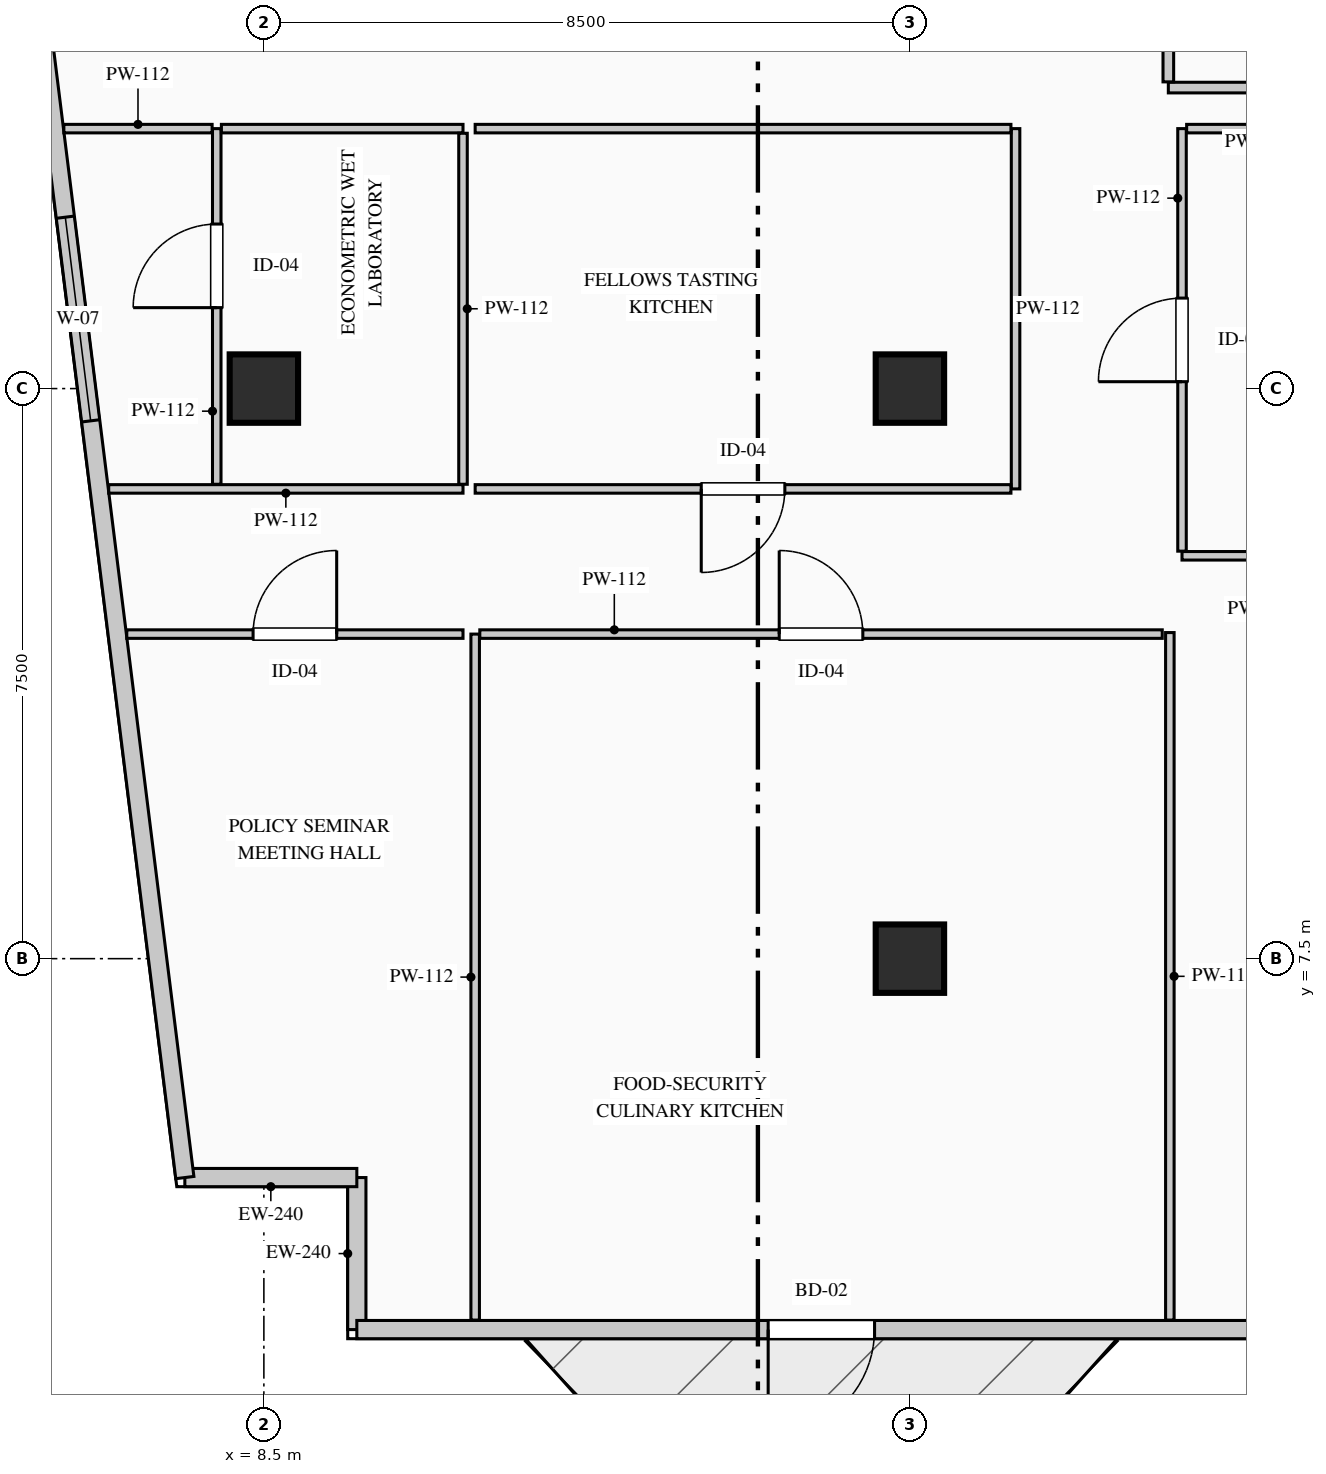
"""IFC4 building model, lengths in metres.
Left out: names, types, materials, properties, quantities, classifications, styles, units other than length and angle.
Written with IfcOpenShell. Run it as: python <this file> out.ifc"""

import sys

from ifc_helpers import new_model, si_unit, direction, frame, frame_2d, origin, origin_2d, place, context, subcontext, project, spatial, rectangle, extrude, element, fill, save


model = new_model("IFC4")
c1 = context("Model", 3, precision=1e-05, world=origin(), true_north=direction((0.0, 1.0)))
c2 = subcontext(c1, "Body", "Model", "MODEL_VIEW")
j1 = project(units=[si_unit("LENGTHUNIT", "METRE"), si_unit("PLANEANGLEUNIT", "RADIAN")], contexts=[c1])
p1 = place(None, origin())
s1 = spatial("IfcSite", under=j1, at=p1, CompositionType="ELEMENT")
p2 = place(p1, origin())
s2 = spatial("IfcBuilding", under=s1, at=p2, CompositionType="ELEMENT")
p3 = place(p2, frame((0.0, 0.0, 207.45)))
s3 = spatial("IfcBuildingStorey", under=s2, at=p3, CompositionType="ELEMENT", Elevation=207.45)
for number, where, z_axis, x_axis in (
    (1, (8.5, 15.0, 0.0), (0.0, 0.0, 1.0), (1.0, 0.0, 0.0)),
    (2, (17.0, 7.5, 0.0), (0.0, 0.0, 1.0), (1.0, 0.0, 0.0)),
    (3, (17.0, 15.0, 0.0), (0.0, 0.0, 1.0), (1.0, 0.0, 0.0)),
):
    element("IfcColumn", number, at=place(p3, frame(where, z_axis=z_axis, x_axis=x_axis)), inside=s3, PredefinedType="COLUMN", context=c2, shape_type="SweptSolid", body=[
        extrude(rectangle(XDim=0.9, YDim=0.9, at=origin_2d()), origin(), (0.0, 0.0, 1.0), 3.95),
    ])
p4 = place(p3, frame((9.723, 2.62, 0.0), z_axis=(0.0, 0.0, 1.0), x_axis=(0.0, 1.0, 0.0)))
e4 = element("IfcWall", 4, at=p4, inside=s3, PredefinedType="STANDARD", context=c2, shape_type="SweptSolid", body=[
    extrude(rectangle(XDim=2.0, YDim=0.24, at=frame_2d((1.0, 0.0))), origin(), (0.0, 0.0, 1.0), 3.7),
])
p5 = place(p3, frame((9.723, 4.62, 0.0), z_axis=(0.0, 0.0, 1.0), x_axis=(-1.0, 0.0, 0.0)))
e5 = element("IfcWall", 5, at=p5, inside=s3, PredefinedType="STANDARD", context=c2, shape_type="SweptSolid", body=[
    extrude(rectangle(XDim=2.263, YDim=0.24, at=frame_2d((1.131, 0.0))), origin(), (0.0, 0.0, 1.0), 3.7),
])
p6 = place(p3, frame((7.46, 4.62, 0.0), z_axis=(0.0, 0.0, 1.0), x_axis=(-0.123515576323, 0.992342633573, 0.0)))
e6 = element("IfcWall", 6, at=p6, inside=s3, PredefinedType="STANDARD", context=c2, shape_type="SweptSolid", body=[
    extrude(rectangle(XDim=37.043, YDim=0.24, at=frame_2d((18.522, 0.0))), origin(), (0.0, 0.0, 1.0), 3.7),
])
p7 = place(p6, frame((10.032, 0.0, 0.9)))
e7 = element("IfcOpeningElement", 7, at=p7, cuts=e6, PredefinedType="OPENING", context=c2, shape_type="SweptSolid", body=[
    extrude(rectangle(XDim=2.7, YDim=2.1, at=frame_2d((1.35, 1.05))), frame((0.0, 0.13, 0.0), z_axis=(0.0, -1.0, 0.0), x_axis=(1.0, 0.0, 0.0)), (0.0, 0.0, 1.0), 0.26),
])
p8 = place(p3, frame((21.946, 2.62, 0.0), z_axis=(0.0, 0.0, 1.0), x_axis=(-1.0, 0.0, 0.0)))
e8 = element("IfcWall", 8, at=p8, inside=s3, PredefinedType="STANDARD", context=c2, shape_type="SweptSolid", body=[
    extrude(rectangle(XDim=12.223, YDim=0.24, at=frame_2d((6.112, 0.0))), origin(), (0.0, 0.0, 1.0), 3.7),
])
p9 = place(p8, frame((5.411, 0.0, 0.0)))
e9 = element("IfcOpeningElement", 9, at=p9, cuts=e8, PredefinedType="OPENING", context=c2, shape_type="SweptSolid", body=[
    extrude(rectangle(XDim=1.4, YDim=2.2, at=frame_2d((0.7, 1.1))), frame((0.0, 0.13, 0.0), z_axis=(0.0, -1.0, 0.0), x_axis=(1.0, 0.0, 0.0)), (0.0, 0.0, 1.0), 0.26),
])
p10 = place(p3, frame((22.725, 18.96, 0.0), z_axis=(0.0, 0.0, 1.0), x_axis=(-1.0, 0.0, 0.0)))
e10 = element("IfcWall", 10, at=p10, inside=s3, PredefinedType="PARTITIONING", context=c2, shape_type="SweptSolid", body=[
    extrude(rectangle(XDim=2.325, YDim=0.14, at=frame_2d((1.163, 0.0))), origin(), (0.0, 0.0, 1.0), 3.7),
])
p11 = place(p3, frame((20.4, 19.035, 0.0), z_axis=(0.0, 0.0, 1.0), x_axis=(0.0, 1.0, 0.0)))
e11 = element("IfcWall", 11, at=p11, inside=s3, PredefinedType="PARTITIONING", context=c2, shape_type="SweptSolid", body=[
    extrude(rectangle(XDim=2.965, YDim=0.14, at=frame_2d((1.482, 0.0))), origin(), (0.0, 0.0, 1.0), 3.7),
])
p12 = place(p11, frame((1.008, 0.0, 0.0)))
e12 = element("IfcOpeningElement", 12, at=p12, cuts=e11, PredefinedType="OPENING", context=c2, shape_type="SweptSolid", body=[
    extrude(rectangle(XDim=0.95, YDim=2.15, at=frame_2d((0.475, 1.075))), frame((0.0, 0.08, 0.0), z_axis=(0.0, -1.0, 0.0), x_axis=(1.0, 0.0, 0.0)), (0.0, 0.0, 1.0), 0.16),
])
p13 = place(p3, frame((11.28, 2.745, 0.0), z_axis=(0.0, 0.0, 1.0), x_axis=(0.0, 1.0, 0.0)))
e13 = element("IfcWall", 13, at=p13, inside=s3, PredefinedType="PARTITIONING", context=c2, shape_type="SweptSolid", body=[
    extrude(rectangle(XDim=9.025, YDim=0.112, at=frame_2d((4.512, 0.0))), origin(), (0.0, 0.0, 1.0), 3.7),
])
p14 = place(p3, frame((11.341, 11.77, 0.0), z_axis=(0.0, 0.0, 1.0), x_axis=(1.0, 0.0, 0.0)))
e14 = element("IfcWall", 14, at=p14, inside=s3, PredefinedType="PARTITIONING", context=c2, shape_type="SweptSolid", body=[
    extrude(rectangle(XDim=8.979, YDim=0.112, at=frame_2d((4.49, 0.0))), origin(), (0.0, 0.0, 1.0), 3.7),
])
p15 = place(p14, frame((3.939, 0.0, 0.0)))
e15 = element("IfcOpeningElement", 15, at=p15, cuts=e14, PredefinedType="OPENING", context=c2, shape_type="SweptSolid", body=[
    extrude(rectangle(XDim=1.1, YDim=2.2, at=frame_2d((0.55, 1.1))), frame((0.0, 0.066, 0.0), z_axis=(0.0, -1.0, 0.0), x_axis=(1.0, 0.0, 0.0)), (0.0, 0.0, 1.0), 0.132),
])
p16 = place(p3, frame((20.42, 11.79, 0.0), z_axis=(0.0, 0.0, 1.0), x_axis=(0.0, -1.0, 0.0)))
e16 = element("IfcWall", 16, at=p16, inside=s3, PredefinedType="PARTITIONING", context=c2, shape_type="SweptSolid", body=[
    extrude(rectangle(XDim=9.045, YDim=0.112, at=frame_2d((4.522, 0.0))), origin(), (0.0, 0.0, 1.0), 3.7),
])
p17 = place(p3, frame((6.696, 11.77, 0.0), z_axis=(0.0, 0.0, 1.0), x_axis=(1.0, 0.0, 0.0)))
e17 = element("IfcWall", 17, at=p17, inside=s3, PredefinedType="PARTITIONING", context=c2, shape_type="SweptSolid", body=[
    extrude(rectangle(XDim=4.424, YDim=0.112, at=frame_2d((2.212, 0.0))), origin(), (0.0, 0.0, 1.0), 3.7),
])
p18 = place(p17, frame((1.662, 0.0, 0.0)))
e18 = element("IfcOpeningElement", 18, at=p18, cuts=e17, PredefinedType="OPENING", context=c2, shape_type="SweptSolid", body=[
    extrude(rectangle(XDim=1.1, YDim=2.2, at=frame_2d((0.55, 1.1))), frame((0.0, 0.066, 0.0), z_axis=(0.0, -1.0, 0.0), x_axis=(1.0, 0.0, 0.0)), (0.0, 0.0, 1.0), 0.132),
])
p19 = place(p3, frame((11.12, 13.68, 0.0), z_axis=(0.0, 0.0, 1.0), x_axis=(-1.0, 0.0, 0.0)))
e19 = element("IfcWall", 19, at=p19, inside=s3, PredefinedType="PARTITIONING", context=c2, shape_type="SweptSolid", body=[
    extrude(rectangle(XDim=4.662, YDim=0.112, at=frame_2d((2.331, 0.0))), origin(), (0.0, 0.0, 1.0), 3.7),
])
p20 = place(p3, frame((7.88, 13.741, 0.0), z_axis=(0.0, 0.0, 1.0), x_axis=(0.0, 1.0, 0.0)))
e20 = element("IfcWall", 20, at=p20, inside=s3, PredefinedType="PARTITIONING", context=c2, shape_type="SweptSolid", body=[
    extrude(rectangle(XDim=4.679, YDim=0.112, at=frame_2d((2.339, 0.0))), origin(), (0.0, 0.0, 1.0), 3.7),
])
p21 = place(p20, frame((2.324, 0.0, 0.0)))
e21 = element("IfcOpeningElement", 21, at=p21, cuts=e20, PredefinedType="OPENING", context=c2, shape_type="SweptSolid", body=[
    extrude(rectangle(XDim=1.1, YDim=2.2, at=frame_2d((0.55, 1.1))), frame((0.0, 0.066, 0.0), z_axis=(0.0, -1.0, 0.0), x_axis=(1.0, 0.0, 0.0)), (0.0, 0.0, 1.0), 0.132),
])
p22 = place(p3, frame((5.868, 18.42, 0.0), z_axis=(0.0, 0.0, 1.0), x_axis=(1.0, 0.0, 0.0)))
e22 = element("IfcWall", 22, at=p22, inside=s3, PredefinedType="PARTITIONING", context=c2, shape_type="SweptSolid", body=[
    extrude(rectangle(XDim=1.951, YDim=0.112, at=frame_2d((0.975, 0.0))), origin(), (0.0, 0.0, 1.0), 3.7),
])
p23 = place(p3, frame((7.941, 18.42, 0.0), z_axis=(0.0, 0.0, 1.0), x_axis=(1.0, 0.0, 0.0)))
e23 = element("IfcWall", 23, at=p23, inside=s3, PredefinedType="PARTITIONING", context=c2, shape_type="SweptSolid", body=[
    extrude(rectangle(XDim=3.179, YDim=0.112, at=frame_2d((1.59, 0.0))), origin(), (0.0, 0.0, 1.0), 3.7),
])
p24 = place(p3, frame((11.12, 18.359, 0.0), z_axis=(0.0, 0.0, 1.0), x_axis=(0.0, -1.0, 0.0)))
e24 = element("IfcWall", 24, at=p24, inside=s3, PredefinedType="PARTITIONING", context=c2, shape_type="SweptSolid", body=[
    extrude(rectangle(XDim=4.618, YDim=0.112, at=frame_2d((2.309, 0.0))), origin(), (0.0, 0.0, 1.0), 3.7),
])
p25 = place(p3, frame((18.39, 18.42, 0.0), z_axis=(0.0, 0.0, 1.0), x_axis=(0.0, -1.0, 0.0)))
e25 = element("IfcWall", 25, at=p25, inside=s3, PredefinedType="PARTITIONING", context=c2, shape_type="SweptSolid", body=[
    extrude(rectangle(XDim=4.74, YDim=0.112, at=frame_2d((2.37, 0.0))), origin(), (0.0, 0.0, 1.0), 3.7),
])
p26 = place(p3, frame((18.329, 13.68, 0.0), z_axis=(0.0, 0.0, 1.0), x_axis=(-1.0, 0.0, 0.0)))
e26 = element("IfcWall", 26, at=p26, inside=s3, PredefinedType="PARTITIONING", context=c2, shape_type="SweptSolid", body=[
    extrude(rectangle(XDim=7.049, YDim=0.112, at=frame_2d((3.524, 0.0))), origin(), (0.0, 0.0, 1.0), 3.7),
])
p27 = place(p26, frame((2.975, 0.0, 0.0)))
e27 = element("IfcOpeningElement", 27, at=p27, cuts=e26, PredefinedType="OPENING", context=c2, shape_type="SweptSolid", body=[
    extrude(rectangle(XDim=1.1, YDim=2.2, at=frame_2d((0.55, 1.1))), frame((0.0, 0.066, 0.0), z_axis=(0.0, -1.0, 0.0), x_axis=(1.0, 0.0, 0.0)), (0.0, 0.0, 1.0), 0.132),
])
p28 = place(p3, frame((11.28, 18.42, 0.0), z_axis=(0.0, 0.0, 1.0), x_axis=(1.0, 0.0, 0.0)))
e28 = element("IfcWall", 28, at=p28, inside=s3, PredefinedType="PARTITIONING", context=c2, shape_type="SweptSolid", body=[
    extrude(rectangle(XDim=7.049, YDim=0.112, at=frame_2d((3.524, 0.0))), origin(), (0.0, 0.0, 1.0), 3.7),
])
p29 = place(p3, frame((22.615, 12.8, 0.0), z_axis=(0.0, 0.0, 1.0), x_axis=(-1.0, 0.0, 0.0)))
e29 = element("IfcWall", 29, at=p29, inside=s3, PredefinedType="PARTITIONING", context=c2, shape_type="SweptSolid", body=[
    extrude(rectangle(XDim=2.035, YDim=0.112, at=frame_2d((1.018, 0.0))), origin(), (0.0, 0.0, 1.0), 3.7),
])
p30 = place(p3, frame((20.58, 12.861, 0.0), z_axis=(0.0, 0.0, 1.0), x_axis=(0.0, 1.0, 0.0)))
e30 = element("IfcWall", 30, at=p30, inside=s3, PredefinedType="PARTITIONING", context=c2, shape_type="SweptSolid", body=[
    extrude(rectangle(XDim=5.559, YDim=0.112, at=frame_2d((2.779, 0.0))), origin(), (0.0, 0.0, 1.0), 3.7),
])
p31 = place(p30, frame((2.229, 0.0, 0.0)))
e31 = element("IfcOpeningElement", 31, at=p31, cuts=e30, PredefinedType="OPENING", context=c2, shape_type="SweptSolid", body=[
    extrude(rectangle(XDim=1.1, YDim=2.2, at=frame_2d((0.55, 1.1))), frame((0.0, 0.066, 0.0), z_axis=(0.0, -1.0, 0.0), x_axis=(1.0, 0.0, 0.0)), (0.0, 0.0, 1.0), 0.132),
])
p32 = place(p3, frame((20.641, 18.42, 0.0), z_axis=(0.0, 0.0, 1.0), x_axis=(1.0, 0.0, 0.0)))
e32 = element("IfcWall", 32, at=p32, inside=s3, PredefinedType="PARTITIONING", context=c2, shape_type="SweptSolid", body=[
    extrude(rectangle(XDim=2.249, YDim=0.112, at=frame_2d((1.125, 0.0))), origin(), (0.0, 0.0, 1.0), 3.7),
])
p33 = place(p7, origin())
e33 = element("IfcWindow", 33, at=p33, inside=s3, PartitioningType="DOUBLE_PANEL_VERTICAL", PredefinedType="WINDOW", context=c2, shape_type="SweptSolid", body=[
    extrude(rectangle(XDim=2.7, YDim=2.1, at=frame_2d((1.35, 1.05))), frame((0.0, 0.03, 0.0), z_axis=(0.0, -1.0, 0.0), x_axis=(1.0, 0.0, 0.0)), (0.0, 0.0, 1.0), 0.06),
])
fill(e7, e33)
p34 = place(p9, origin())
e34 = element("IfcDoor", 34, at=p34, inside=s3, OperationType="SINGLE_SWING_RIGHT", PredefinedType="DOOR", context=c2, shape_type="SweptSolid", body=[
    extrude(rectangle(XDim=1.4, YDim=2.2, at=frame_2d((0.7, 1.1))), frame((0.0, 0.025, 0.0), z_axis=(0.0, -1.0, 0.0), x_axis=(1.0, 0.0, 0.0)), (0.0, 0.0, 1.0), 0.05),
])
fill(e9, e34)
p35 = place(p15, origin())
e35 = element("IfcDoor", 35, at=p35, inside=s3, OperationType="SINGLE_SWING_LEFT", PredefinedType="DOOR", context=c2, shape_type="SweptSolid", body=[
    extrude(rectangle(XDim=1.1, YDim=2.2, at=frame_2d((0.55, 1.1))), frame((0.0, 0.025, 0.0), z_axis=(0.0, -1.0, 0.0), x_axis=(1.0, 0.0, 0.0)), (0.0, 0.0, 1.0), 0.05),
])
fill(e15, e35)
p36 = place(p18, origin())
e36 = element("IfcDoor", 36, at=p36, inside=s3, OperationType="SINGLE_SWING_RIGHT", PredefinedType="DOOR", context=c2, shape_type="SweptSolid", body=[
    extrude(rectangle(XDim=1.1, YDim=2.2, at=frame_2d((0.55, 1.1))), frame((0.0, 0.025, 0.0), z_axis=(0.0, -1.0, 0.0), x_axis=(1.0, 0.0, 0.0)), (0.0, 0.0, 1.0), 0.05),
])
fill(e18, e36)
p37 = place(p21, origin())
e37 = element("IfcDoor", 37, at=p37, inside=s3, OperationType="SINGLE_SWING_LEFT", PredefinedType="DOOR", context=c2, shape_type="SweptSolid", body=[
    extrude(rectangle(XDim=1.1, YDim=2.2, at=frame_2d((0.55, 1.1))), frame((0.0, 0.025, 0.0), z_axis=(0.0, -1.0, 0.0), x_axis=(1.0, 0.0, 0.0)), (0.0, 0.0, 1.0), 0.05),
])
fill(e21, e37)
p38 = place(p27, origin())
e38 = element("IfcDoor", 38, at=p38, inside=s3, OperationType="SINGLE_SWING_RIGHT", PredefinedType="DOOR", context=c2, shape_type="SweptSolid", body=[
    extrude(rectangle(XDim=1.1, YDim=2.2, at=frame_2d((0.55, 1.1))), frame((0.0, 0.025, 0.0), z_axis=(0.0, -1.0, 0.0), x_axis=(1.0, 0.0, 0.0)), (0.0, 0.0, 1.0), 0.05),
])
fill(e27, e38)
p39 = place(p31, origin())
e39 = element("IfcDoor", 39, at=p39, inside=s3, OperationType="SINGLE_SWING_LEFT", PredefinedType="DOOR", context=c2, shape_type="SweptSolid", body=[
    extrude(rectangle(XDim=1.1, YDim=2.2, at=frame_2d((0.55, 1.1))), frame((0.0, 0.025, 0.0), z_axis=(0.0, -1.0, 0.0), x_axis=(1.0, 0.0, 0.0)), (0.0, 0.0, 1.0), 0.05),
])
fill(e31, e39)
save(model, sys.argv[1])
